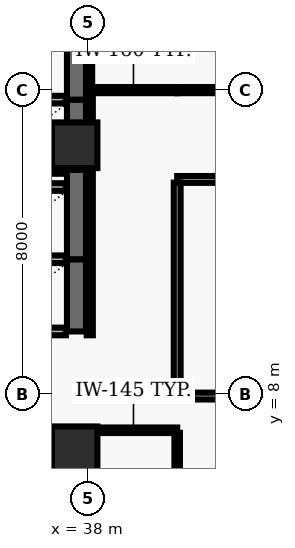
"""IFC4 building model, lengths in metres.
Left out: names, types, materials, properties, quantities, classifications, styles, units other than length and angle.
Written with IfcOpenShell. Run it as: python <this file> out.ifc"""

import sys

from ifc_helpers import new_model, si_unit, direction, frame, frame_2d, origin, origin_2d, place, context, subcontext, project, spatial, rectangle, extrude, element, save


model = new_model("IFC4")
c1 = context("Model", 3, precision=1e-05, world=origin(), true_north=direction((0.0, 1.0)))
c2 = subcontext(c1, "Body", "Model", "MODEL_VIEW")
j1 = project(units=[si_unit("LENGTHUNIT", "METRE"), si_unit("PLANEANGLEUNIT", "RADIAN")], contexts=[c1])
p1 = place(None, origin())
s1 = spatial("IfcSite", under=j1, at=p1, CompositionType="ELEMENT")
p2 = place(p1, origin())
s2 = spatial("IfcBuilding", under=s1, at=p2, CompositionType="ELEMENT")
p3 = place(p2, frame((0.0, 0.0, 134.6)))
s3 = spatial("IfcBuildingStorey", under=s2, at=p3, CompositionType="ELEMENT", Elevation=134.6)
for number, where, z_axis, x_axis in (
    (1, (37.65, 6.55, 0.0), (0.0, 0.0, 1.0), (1.0, 0.0, 0.0)),
    (2, (37.65, 14.55, 0.0), (0.0, 0.0, 1.0), (1.0, 0.0, 0.0)),
):
    element("IfcColumn", number, at=place(p3, frame(where, z_axis=z_axis, x_axis=x_axis)), inside=s3, PredefinedType="COLUMN", context=c2, shape_type="SweptSolid", body=[
        extrude(rectangle(XDim=1.2, YDim=1.2, at=origin_2d()), origin(), (0.0, 0.0, 1.0), 3.9),
    ])
p4 = place(p3, frame((37.7, 4.7, 0.0), z_axis=(0.0, 0.0, 1.0), x_axis=(0.0, 1.0, 0.0)))
e3 = element("IfcWall", 3, at=p4, inside=s3, PredefinedType="SHEAR", context=c2, shape_type="SweptSolid", body=[
    extrude(rectangle(XDim=2.25, YDim=0.5, at=frame_2d((1.125, 0.0))), origin(), (0.0, 0.0, 1.0), 3.69),
])
p5 = place(p3, frame((37.42, 6.95, 0.0), z_axis=(0.0, 0.0, 1.0), x_axis=(-1.0, 0.0, 0.0)))
e4 = element("IfcWall", 4, at=p5, inside=s3, PredefinedType="SOLIDWALL", context=c2, shape_type="SweptSolid", body=[
    extrude(rectangle(XDim=2.14, YDim=0.2, at=frame_2d((1.07, 0.0))), origin(), (0.0, 0.0, 1.0), 3.69),
])
p6 = place(p3, frame((37.7, 9.65, 0.0), z_axis=(0.0, 0.0, 1.0), x_axis=(0.0, 1.0, 0.0)))
e5 = element("IfcWall", 5, at=p6, inside=s3, PredefinedType="SHEAR", context=c2, shape_type="SweptSolid", body=[
    extrude(rectangle(XDim=1.9, YDim=0.5, at=frame_2d((0.95, 0.0))), origin(), (0.0, 0.0, 1.0), 3.69),
])
for number, where, z_axis, x_axis in (
    (6, (35.28, 9.65, 0.0), (0.0, 0.0, 1.0), (1.0, 0.0, 0.0)),
    (7, (37.42, 11.55, 0.0), (0.0, 0.0, 1.0), (-1.0, 0.0, 0.0)),
):
    element("IfcWall", number, at=place(p3, frame(where, z_axis=z_axis, x_axis=x_axis)), inside=s3, PredefinedType="SOLIDWALL", context=c2, shape_type="SweptSolid", body=[
        extrude(rectangle(XDim=2.14, YDim=0.2, at=frame_2d((1.07, 0.0))), origin(), (0.0, 0.0, 1.0), 3.69),
    ])
p7 = place(p3, frame((37.7, 11.55, 0.0), z_axis=(0.0, 0.0, 1.0), x_axis=(0.0, 1.0, 0.0)))
e8 = element("IfcWall", 8, at=p7, inside=s3, PredefinedType="SHEAR", context=c2, shape_type="SweptSolid", body=[
    extrude(rectangle(XDim=2.35, YDim=0.5, at=frame_2d((1.175, 0.0))), origin(), (0.0, 0.0, 1.0), 3.69),
])
p8 = place(p3, frame((37.42, 13.45, 0.0), z_axis=(0.0, 0.0, 1.0), x_axis=(-1.0, 0.0, 0.0)))
e9 = element("IfcWall", 9, at=p8, inside=s3, PredefinedType="SOLIDWALL", context=c2, shape_type="SweptSolid", body=[
    extrude(rectangle(XDim=2.14, YDim=0.2, at=frame_2d((1.07, 0.0))), origin(), (0.0, 0.0, 1.0), 3.69),
])
p9 = place(p3, frame((37.7, 13.9, 0.0), z_axis=(0.0, 0.0, 1.0), x_axis=(0.0, 1.0, 0.0)))
e10 = element("IfcWall", 10, at=p9, inside=s3, PredefinedType="SHEAR", context=c2, shape_type="SweptSolid", body=[
    extrude(rectangle(XDim=1.85, YDim=0.5, at=frame_2d((0.925, 0.0))), origin(), (0.0, 0.0, 1.0), 3.69),
])
for number, where, z_axis, x_axis in (
    (11, (35.28, 13.9, 0.0), (0.0, 0.0, 1.0), (1.0, 0.0, 0.0)),
    (12, (37.42, 15.75, 0.0), (0.0, 0.0, 1.0), (-1.0, 0.0, 0.0)),
):
    element("IfcWall", number, at=place(p3, frame(where, z_axis=z_axis, x_axis=x_axis)), inside=s3, PredefinedType="SOLIDWALL", context=c2, shape_type="SweptSolid", body=[
        extrude(rectangle(XDim=2.14, YDim=0.2, at=frame_2d((1.07, 0.0))), origin(), (0.0, 0.0, 1.0), 3.69),
    ])
p10 = place(p3, frame((37.7, 15.75, 0.0), z_axis=(0.0, 0.0, 1.0), x_axis=(0.0, 1.0, 0.0)))
e13 = element("IfcWall", 13, at=p10, inside=s3, PredefinedType="SHEAR", context=c2, shape_type="SweptSolid", body=[
    extrude(rectangle(XDim=1.85, YDim=0.5, at=frame_2d((0.925, 0.0))), origin(), (0.0, 0.0, 1.0), 3.69),
])
p11 = place(p3, frame((38.05, 7.05, 0.0), z_axis=(0.0, 0.0, 1.0), x_axis=(1.0, 0.0, 0.0)))
e14 = element("IfcWall", 14, at=p11, inside=s3, PredefinedType="PARTITIONING", context=c2, shape_type="SweptSolid", body=[
    extrude(rectangle(XDim=2.3, YDim=0.145, at=frame_2d((1.15, 0.0))), origin(), (0.0, 0.0, 1.0), 3.69),
])
p12 = place(p3, frame((40.35, 13.65, 0.0), z_axis=(0.0, 0.0, 1.0), x_axis=(1.0, 0.0, 0.0)))
e15 = element("IfcWall", 15, at=p12, inside=s3, PredefinedType="PARTITIONING", context=c2, shape_type="SweptSolid", body=[
    extrude(rectangle(XDim=5.65, YDim=0.18, at=frame_2d((2.825, 0.0))), origin(), (0.0, 0.0, 1.0), 3.69),
])
p13 = place(p12, frame((2.35, 0.0, 0.0)))
e16 = element("IfcOpeningElement", 16, at=p13, cuts=e15, PredefinedType="OPENING", context=c2, shape_type="SweptSolid", body=[
    extrude(rectangle(XDim=0.95, YDim=2.1, at=frame_2d((0.475, 1.05))), frame((0.0, 0.1, 0.0), z_axis=(0.0, -1.0, 0.0), x_axis=(1.0, 0.0, 0.0)), (0.0, 0.0, 1.0), 0.2),
])
p14 = place(p3, frame((40.35, 16.0, 0.0), z_axis=(0.0, 0.0, 1.0), x_axis=(-1.0, 0.0, 0.0)))
e17 = element("IfcWall", 17, at=p14, inside=s3, PredefinedType="PARTITIONING", context=c2, shape_type="SweptSolid", body=[
    extrude(rectangle(XDim=2.3, YDim=0.16, at=frame_2d((1.15, 0.0))), origin(), (0.0, 0.0, 1.0), 3.69),
])
p15 = place(p3, frame((40.35, 16.0, 0.0), z_axis=(0.0, 0.0, 1.0), x_axis=(1.0, 0.0, 0.0)))
e18 = element("IfcWall", 18, at=p15, inside=s3, PredefinedType="PARTITIONING", context=c2, shape_type="SweptSolid", body=[
    extrude(rectangle(XDim=6.204, YDim=0.16, at=frame_2d((3.102, 0.0))), origin(), (0.0, 0.0, 1.0), 3.39),
])
p16 = place(p15, frame((2.652, 0.0, 0.0)))
e19 = element("IfcOpeningElement", 19, at=p16, cuts=e18, PredefinedType="OPENING", context=c2, shape_type="SweptSolid", body=[
    extrude(rectangle(XDim=0.9, YDim=2.1, at=frame_2d((0.45, 1.05))), frame((0.0, 0.09, 0.0), z_axis=(0.0, -1.0, 0.0), x_axis=(1.0, 0.0, 0.0)), (0.0, 0.0, 1.0), 0.18),
])
p17 = place(p3, frame((46.0, 7.95, 0.0), z_axis=(0.0, 0.0, 1.0), x_axis=(-1.0, 0.0, 0.0)))
e20 = element("IfcWall", 20, at=p17, inside=s3, PredefinedType="PARTITIONING", context=c2, shape_type="SweptSolid", body=[
    extrude(rectangle(XDim=5.65, YDim=0.18, at=frame_2d((2.825, 0.0))), origin(), (0.0, 0.0, 1.0), 3.074),
])
p18 = place(p17, frame((2.275, 0.0, 0.0)))
e21 = element("IfcOpeningElement", 21, at=p18, cuts=e20, PredefinedType="OPENING", context=c2, shape_type="SweptSolid", body=[
    extrude(rectangle(XDim=1.1, YDim=2.15, at=frame_2d((0.55, 1.075))), frame((0.0, 0.1, 0.0), z_axis=(0.0, -1.0, 0.0), x_axis=(1.0, 0.0, 0.0)), (0.0, 0.0, 1.0), 0.2),
])
p19 = place(p3, frame((38.05, 6.982, 0.0), z_axis=(0.0, 0.0, 1.0), x_axis=(0.0, -1.0, 0.0)))
e22 = element("IfcWall", 22, at=p19, inside=s3, PredefinedType="PARTITIONING", context=c2, shape_type="SweptSolid", body=[
    extrude(rectangle(XDim=6.837, YDim=0.145, at=frame_2d((3.418, 0.0))), origin(), (0.0, 0.0, 1.0), 3.074),
])
p20 = place(p3, frame((38.05, 15.925, 0.0), z_axis=(0.0, 0.0, 1.0), x_axis=(0.0, -1.0, 0.0)))
e23 = element("IfcWall", 23, at=p20, inside=s3, PredefinedType="PARTITIONING", context=c2, shape_type="SweptSolid", body=[
    extrude(rectangle(XDim=6.375, YDim=0.16, at=frame_2d((3.188, 0.0))), origin(), (0.0, 0.0, 1.0), 3.074),
])
p21 = place(p3, frame((38.05, 23.85, 0.0), z_axis=(0.0, 0.0, 1.0), x_axis=(0.0, -1.0, 0.0)))
e24 = element("IfcWall", 24, at=p21, inside=s3, PredefinedType="PARTITIONING", context=c2, shape_type="SweptSolid", body=[
    extrude(rectangle(XDim=7.775, YDim=0.125, at=frame_2d((3.888, 0.0))), origin(), (0.0, 0.0, 1.0), 3.074),
])
p22 = place(p3, frame((40.35, 0.145, 0.0), z_axis=(0.0, 0.0, 1.0), x_axis=(0.0, 1.0, 0.0)))
e25 = element("IfcWall", 25, at=p22, inside=s3, PredefinedType="PARTITIONING", context=c2, shape_type="SweptSolid", body=[
    extrude(rectangle(XDim=6.837, YDim=0.145, at=frame_2d((3.418, 0.0))), origin(), (0.0, 0.0, 1.0), 3.69),
])
p23 = place(p22, frame((2.869, 0.0, 0.0)))
e26 = element("IfcOpeningElement", 26, at=p23, cuts=e25, PredefinedType="OPENING", context=c2, shape_type="SweptSolid", body=[
    extrude(rectangle(XDim=1.1, YDim=2.15, at=frame_2d((0.55, 1.075))), frame((0.0, 0.083, 0.0), z_axis=(0.0, -1.0, 0.0), x_axis=(1.0, 0.0, 0.0)), (0.0, 0.0, 1.0), 0.165),
])
p24 = place(p3, frame((40.35, 8.035, 0.0), z_axis=(0.0, 0.0, 1.0), x_axis=(0.0, 1.0, 0.0)))
e27 = element("IfcWall", 27, at=p24, inside=s3, PredefinedType="PARTITIONING", context=c2, shape_type="SweptSolid", body=[
    extrude(rectangle(XDim=5.53, YDim=0.18, at=frame_2d((2.765, 0.0))), origin(), (0.0, 0.0, 1.0), 3.69),
])
save(model, sys.argv[1])
